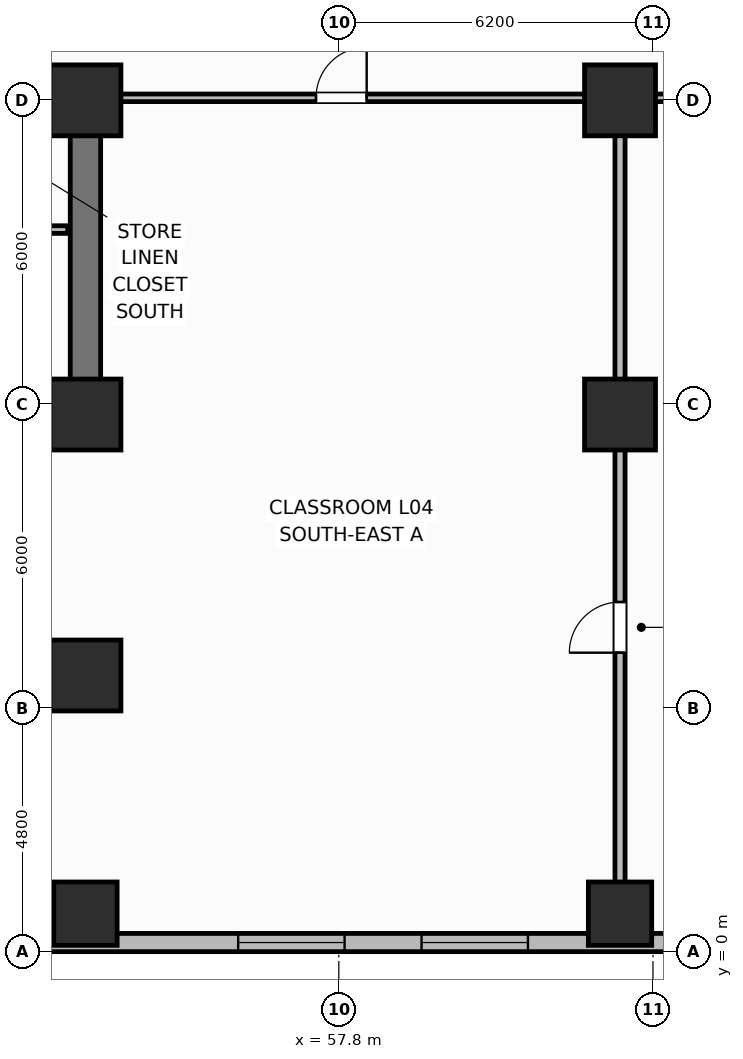
"""IFC4 building model, lengths in metres.
Left out: names, types, materials, properties, quantities, classifications, styles, units other than length and angle.
Written with IfcOpenShell. Run it as: python <this file> out.ifc"""

import sys

from ifc_helpers import new_model, si_unit, direction, frame, frame_2d, origin, origin_2d, place, context, subcontext, project, spatial, rectangle, extrude, element, fill, save


model = new_model("IFC4")
c1 = context("Model", 3, precision=1e-05, world=origin(), true_north=direction((0.0, 1.0)))
c2 = subcontext(c1, "Body", "Model", "MODEL_VIEW")
j1 = project(units=[si_unit("LENGTHUNIT", "METRE"), si_unit("PLANEANGLEUNIT", "RADIAN")], contexts=[c1])
p1 = place(None, origin())
s1 = spatial("IfcSite", under=j1, at=p1, CompositionType="ELEMENT")
p2 = place(p1, origin())
s2 = spatial("IfcBuilding", under=s1, at=p2, CompositionType="ELEMENT")
p3 = place(p2, frame((0.0, 0.0, 20.1)))
s3 = spatial("IfcBuildingStorey", under=s2, at=p3, CompositionType="ELEMENT", Elevation=20.1)
p4 = place(p3, frame((52.8, 10.6, 0.0), z_axis=(0.0, 0.0, 1.0), x_axis=(-1.0, 0.0, 0.0)))
e1 = element("IfcWall", 1, at=p4, inside=s3, PredefinedType="SHEAR", context=c2, shape_type="SweptSolid", body=[
    extrude(rectangle(XDim=27.2, YDim=0.6, at=frame_2d((13.6, 0.0))), origin(), (0.0, 0.0, 1.0), 4.5),
])
p5 = place(p3, frame((52.8, 10.9, 0.0), z_axis=(0.0, 0.0, 1.0), x_axis=(0.0, 1.0, 0.0)))
e2 = element("IfcWall", 2, at=p5, inside=s3, PredefinedType="SHEAR", context=c2, shape_type="SweptSolid", body=[
    extrude(rectangle(XDim=5.6, YDim=0.6, at=frame_2d((2.8, 0.0))), origin(), (0.0, 0.0, 1.0), 4.5),
])
p6 = place(p3, frame((25.6, 16.8, 0.0), z_axis=(0.0, 0.0, 1.0), x_axis=(1.0, 0.0, 0.0)))
e3 = element("IfcWall", 3, at=p6, inside=s3, PredefinedType="SHEAR", context=c2, shape_type="SweptSolid", body=[
    extrude(rectangle(XDim=27.2, YDim=0.6, at=frame_2d((13.6, 0.0))), origin(), (0.0, 0.0, 1.0), 4.5),
])
p7 = place(p6, frame((1.8, 0.0, 0.0)))
e4 = element("IfcOpeningElement", 4, at=p7, cuts=e3, PredefinedType="OPENING", context=c2, shape_type="SweptSolid", body=[
    extrude(rectangle(XDim=1.1, YDim=2.15, at=frame_2d((0.55, 1.075))), frame((0.0, 0.31, 0.0), z_axis=(0.0, -1.0, 0.0), x_axis=(1.0, 0.0, 0.0)), (0.0, 0.0, 1.0), 0.62),
])
p8 = place(p6, frame((5.6, 0.0, 0.0)))
e5 = element("IfcOpeningElement", 5, at=p8, cuts=e3, PredefinedType="OPENING", context=c2, shape_type="SweptSolid", body=[
    extrude(rectangle(XDim=0.85, YDim=2.1, at=frame_2d((0.425, 1.05))), frame((0.0, 0.31, 0.0), z_axis=(0.0, -1.0, 0.0), x_axis=(1.0, 0.0, 0.0)), (0.0, 0.0, 1.0), 0.62),
])
p9 = place(p6, frame((13.0, 0.0, 0.0)))
e6 = element("IfcOpeningElement", 6, at=p9, cuts=e3, PredefinedType="OPENING", context=c2, shape_type="SweptSolid", body=[
    extrude(rectangle(XDim=1.2, YDim=2.15, at=frame_2d((0.6, 1.075))), frame((0.0, 0.31, 0.0), z_axis=(0.0, -1.0, 0.0), x_axis=(1.0, 0.0, 0.0)), (0.0, 0.0, 1.0), 0.62),
])
p10 = place(p6, frame((20.4, 0.0, 0.0)))
e7 = element("IfcOpeningElement", 7, at=p10, cuts=e3, PredefinedType="OPENING", context=c2, shape_type="SweptSolid", body=[
    extrude(rectangle(XDim=1.3, YDim=2.2, at=frame_2d((0.65, 1.1))), frame((0.0, 0.31, 0.0), z_axis=(0.0, -1.0, 0.0), x_axis=(1.0, 0.0, 0.0)), (0.0, 0.0, 1.0), 0.62),
])
p11 = place(p6, frame((24.65, 0.0, 0.0)))
e8 = element("IfcOpeningElement", 8, at=p11, cuts=e3, PredefinedType="OPENING", context=c2, shape_type="SweptSolid", body=[
    extrude(rectangle(XDim=0.85, YDim=2.1, at=frame_2d((0.425, 1.05))), frame((0.0, 0.31, 0.0), z_axis=(0.0, -1.0, 0.0), x_axis=(1.0, 0.0, 0.0)), (0.0, 0.0, 1.0), 0.62),
])
for number, where, z_axis, x_axis in (
    (9, (52.8, 10.6, 0.0), (0.0, 0.0, 1.0), (1.0, 0.0, 0.0)),
    (10, (52.8, 16.8, 0.0), (0.0, 0.0, 1.0), (1.0, 0.0, 0.0)),
):
    element("IfcColumn", number, at=place(p3, frame(where, z_axis=z_axis, x_axis=x_axis)), inside=s3, PredefinedType="COLUMN", context=c2, shape_type="SweptSolid", body=[
        extrude(rectangle(XDim=1.4, YDim=1.4, at=origin_2d()), origin(), (0.0, 0.0, 1.0), 4.5),
    ])
for number, where, z_axis, x_axis in (
    (11, (52.8, 0.75, 0.0), (0.0, 0.0, 1.0), (1.0, 0.0, 0.0)),
    (12, (63.35, 0.75, 0.0), (0.0, 0.0, 1.0), (1.0, 0.0, 0.0)),
):
    element("IfcColumn", number, at=place(p3, frame(where, z_axis=z_axis, x_axis=x_axis)), inside=s3, PredefinedType="COLUMN", context=c2, shape_type="SweptSolid", body=[
        extrude(rectangle(XDim=1.25, YDim=1.25, at=origin_2d()), origin(), (0.0, 0.0, 1.0), 4.5),
    ])
for number, where, z_axis, x_axis in (
    (13, (52.8, 5.45, 0.0), (0.0, 0.0, 1.0), (1.0, 0.0, 0.0)),
    (14, (63.35, 10.6, 0.0), (0.0, 0.0, 1.0), (1.0, 0.0, 0.0)),
    (15, (63.35, 16.8, 0.0), (0.0, 0.0, 1.0), (1.0, 0.0, 0.0)),
):
    element("IfcColumn", number, at=place(p3, frame(where, z_axis=z_axis, x_axis=x_axis)), inside=s3, PredefinedType="COLUMN", context=c2, shape_type="SweptSolid", body=[
        extrude(rectangle(XDim=1.4, YDim=1.4, at=origin_2d()), origin(), (0.0, 0.0, 1.0), 4.5),
    ])
p12 = place(p3, frame((21.83, 0.18, 0.0), z_axis=(0.0, 0.0, 1.0), x_axis=(1.0, 0.0, 0.0)))
e16 = element("IfcWall", 16, at=p12, inside=s3, PredefinedType="SOLIDWALL", context=c2, shape_type="SweptSolid", body=[
    extrude(rectangle(XDim=55.59, YDim=0.36, at=frame_2d((27.795, 0.0))), origin(), (0.0, 0.0, 1.0), 2.3),
])
p13 = place(p12, frame((5.029, 0.0, 0.3)))
e17 = element("IfcOpeningElement", 17, at=p13, cuts=e16, PredefinedType="OPENING", context=c2, shape_type="SweptSolid", body=[
    extrude(rectangle(XDim=2.1, YDim=2.2, at=frame_2d((1.05, 1.1))), frame((0.0, 0.19, 0.0), z_axis=(0.0, -1.0, 0.0), x_axis=(1.0, 0.0, 0.0)), (0.0, 0.0, 1.0), 0.38),
])
p14 = place(p12, frame((8.648, 0.0, 0.3)))
e18 = element("IfcOpeningElement", 18, at=p14, cuts=e16, PredefinedType="OPENING", context=c2, shape_type="SweptSolid", body=[
    extrude(rectangle(XDim=2.1, YDim=2.2, at=frame_2d((1.05, 1.1))), frame((0.0, 0.19, 0.0), z_axis=(0.0, -1.0, 0.0), x_axis=(1.0, 0.0, 0.0)), (0.0, 0.0, 1.0), 0.38),
])
p15 = place(p12, frame((12.268, 0.0, 0.3)))
e19 = element("IfcOpeningElement", 19, at=p15, cuts=e16, PredefinedType="OPENING", context=c2, shape_type="SweptSolid", body=[
    extrude(rectangle(XDim=2.1, YDim=2.2, at=frame_2d((1.05, 1.1))), frame((0.0, 0.19, 0.0), z_axis=(0.0, -1.0, 0.0), x_axis=(1.0, 0.0, 0.0)), (0.0, 0.0, 1.0), 0.38),
])
p16 = place(p12, frame((19.506, 0.0, 0.3)))
e20 = element("IfcOpeningElement", 20, at=p16, cuts=e16, PredefinedType="OPENING", context=c2, shape_type="SweptSolid", body=[
    extrude(rectangle(XDim=2.1, YDim=2.2, at=frame_2d((1.05, 1.1))), frame((0.0, 0.19, 0.0), z_axis=(0.0, -1.0, 0.0), x_axis=(1.0, 0.0, 0.0)), (0.0, 0.0, 1.0), 0.38),
])
p17 = place(p12, frame((23.126, 0.0, 0.3)))
e21 = element("IfcOpeningElement", 21, at=p17, cuts=e16, PredefinedType="OPENING", context=c2, shape_type="SweptSolid", body=[
    extrude(rectangle(XDim=2.1, YDim=2.2, at=frame_2d((1.05, 1.1))), frame((0.0, 0.19, 0.0), z_axis=(0.0, -1.0, 0.0), x_axis=(1.0, 0.0, 0.0)), (0.0, 0.0, 1.0), 0.38),
])
p18 = place(p12, frame((26.745, 0.0, 0.3)))
e22 = element("IfcOpeningElement", 22, at=p18, cuts=e16, PredefinedType="OPENING", context=c2, shape_type="SweptSolid", body=[
    extrude(rectangle(XDim=2.1, YDim=2.2, at=frame_2d((1.05, 1.1))), frame((0.0, 0.19, 0.0), z_axis=(0.0, -1.0, 0.0), x_axis=(1.0, 0.0, 0.0)), (0.0, 0.0, 1.0), 0.38),
])
p19 = place(p12, frame((33.984, 0.0, 0.3)))
e23 = element("IfcOpeningElement", 23, at=p19, cuts=e16, PredefinedType="OPENING", context=c2, shape_type="SweptSolid", body=[
    extrude(rectangle(XDim=2.1, YDim=2.2, at=frame_2d((1.05, 1.1))), frame((0.0, 0.19, 0.0), z_axis=(0.0, -1.0, 0.0), x_axis=(1.0, 0.0, 0.0)), (0.0, 0.0, 1.0), 0.38),
])
p20 = place(p12, frame((37.603, 0.0, 0.3)))
e24 = element("IfcOpeningElement", 24, at=p20, cuts=e16, PredefinedType="OPENING", context=c2, shape_type="SweptSolid", body=[
    extrude(rectangle(XDim=2.1, YDim=2.2, at=frame_2d((1.05, 1.1))), frame((0.0, 0.19, 0.0), z_axis=(0.0, -1.0, 0.0), x_axis=(1.0, 0.0, 0.0)), (0.0, 0.0, 1.0), 0.38),
])
p21 = place(p12, frame((44.842, 0.0, 0.3)))
e25 = element("IfcOpeningElement", 25, at=p21, cuts=e16, PredefinedType="OPENING", context=c2, shape_type="SweptSolid", body=[
    extrude(rectangle(XDim=2.1, YDim=2.2, at=frame_2d((1.05, 1.1))), frame((0.0, 0.19, 0.0), z_axis=(0.0, -1.0, 0.0), x_axis=(1.0, 0.0, 0.0)), (0.0, 0.0, 1.0), 0.38),
])
p22 = place(p12, frame((52.08, 0.0, 0.3)))
e26 = element("IfcOpeningElement", 26, at=p22, cuts=e16, PredefinedType="OPENING", context=c2, shape_type="SweptSolid", body=[
    extrude(rectangle(XDim=2.1, YDim=2.2, at=frame_2d((1.05, 1.1))), frame((0.0, 0.19, 0.0), z_axis=(0.0, -1.0, 0.0), x_axis=(1.0, 0.0, 0.0)), (0.0, 0.0, 1.0), 0.38),
])
p23 = place(p3, frame((49.6, 14.25, 0.0), z_axis=(0.0, 0.0, 1.0), x_axis=(1.0, 0.0, 0.0)))
e27 = element("IfcWall", 27, at=p23, inside=s3, PredefinedType="PARTITIONING", context=c2, shape_type="SweptSolid", body=[
    extrude(rectangle(XDim=2.85, YDim=0.15, at=frame_2d((1.425, 0.0))), origin(), (0.0, 0.0, 1.0), 2.26),
])
p24 = place(p23, frame((0.9, 0.0, 0.0)))
e28 = element("IfcOpeningElement", 28, at=p24, cuts=e27, PredefinedType="OPENING", context=c2, shape_type="SweptSolid", body=[
    extrude(rectangle(XDim=0.85, YDim=2.1, at=frame_2d((0.425, 1.05))), frame((0.0, 0.085, 0.0), z_axis=(0.0, -1.0, 0.0), x_axis=(1.0, 0.0, 0.0)), (0.0, 0.0, 1.0), 0.17),
])
p25 = place(p3, frame((63.35, 0.4, 0.0), z_axis=(0.0, 0.0, 1.0), x_axis=(0.0, 1.0, 0.0)))
e29 = element("IfcWall", 29, at=p25, inside=s3, PredefinedType="PARTITIONING", context=c2, shape_type="SweptSolid", body=[
    extrude(rectangle(XDim=16.4, YDim=0.2, at=frame_2d((8.2, 0.0))), origin(), (0.0, 0.0, 1.0), 2.26),
])
p26 = place(p25, frame((5.5, 0.0, 0.0)))
e30 = element("IfcOpeningElement", 30, at=p26, cuts=e29, PredefinedType="OPENING", context=c2, shape_type="SweptSolid", body=[
    extrude(rectangle(XDim=1.0, YDim=2.15, at=frame_2d((0.5, 1.075))), frame((0.0, 0.11, 0.0), z_axis=(0.0, -1.0, 0.0), x_axis=(1.0, 0.0, 0.0)), (0.0, 0.0, 1.0), 0.22),
])
p27 = place(p3, frame((53.15, 16.85, 0.0), z_axis=(0.0, 0.0, 1.0), x_axis=(1.0, 0.0, 0.0)))
e31 = element("IfcWall", 31, at=p27, inside=s3, PredefinedType="PARTITIONING", context=c2, shape_type="SweptSolid", body=[
    extrude(rectangle(XDim=13.25, YDim=0.15, at=frame_2d((6.625, 0.0))), origin(), (0.0, 0.0, 1.0), 2.26),
])
p28 = place(p27, frame((4.2, 0.0, 0.0)))
e32 = element("IfcOpeningElement", 32, at=p28, cuts=e31, PredefinedType="OPENING", context=c2, shape_type="SweptSolid", body=[
    extrude(rectangle(XDim=1.0, YDim=2.15, at=frame_2d((0.5, 1.075))), frame((0.0, 0.085, 0.0), z_axis=(0.0, -1.0, 0.0), x_axis=(1.0, 0.0, 0.0)), (0.0, 0.0, 1.0), 0.17),
])
p29 = place(p19, origin())
e33 = element("IfcWindow", 33, at=p29, inside=s3, PartitioningType="SINGLE_PANEL", PredefinedType="WINDOW", context=c2, shape_type="SweptSolid", body=[
    extrude(rectangle(XDim=2.1, YDim=2.2, at=frame_2d((1.05, 1.1))), frame((0.0, 0.03, 0.0), z_axis=(0.0, -1.0, 0.0), x_axis=(1.0, 0.0, 0.0)), (0.0, 0.0, 1.0), 0.06),
])
fill(e23, e33)
p30 = place(p20, origin())
e34 = element("IfcWindow", 34, at=p30, inside=s3, PartitioningType="SINGLE_PANEL", PredefinedType="WINDOW", context=c2, shape_type="SweptSolid", body=[
    extrude(rectangle(XDim=2.1, YDim=2.2, at=frame_2d((1.05, 1.1))), frame((0.0, 0.03, 0.0), z_axis=(0.0, -1.0, 0.0), x_axis=(1.0, 0.0, 0.0)), (0.0, 0.0, 1.0), 0.06),
])
fill(e24, e34)
p31 = place(p26, origin())
e35 = element("IfcDoor", 35, at=p31, inside=s3, OperationType="SINGLE_SWING_LEFT", PredefinedType="DOOR", context=c2, shape_type="SweptSolid", body=[
    extrude(rectangle(XDim=1.0, YDim=2.15, at=frame_2d((0.5, 1.075))), frame((0.0, 0.025, 0.0), z_axis=(0.0, -1.0, 0.0), x_axis=(1.0, 0.0, 0.0)), (0.0, 0.0, 1.0), 0.05),
])
fill(e30, e35)
p32 = place(p28, origin())
e36 = element("IfcDoor", 36, at=p32, inside=s3, OperationType="SINGLE_SWING_RIGHT", PredefinedType="DOOR", context=c2, shape_type="SweptSolid", body=[
    extrude(rectangle(XDim=1.0, YDim=2.15, at=frame_2d((0.5, 1.075))), frame((0.0, 0.025, 0.0), z_axis=(0.0, -1.0, 0.0), x_axis=(1.0, 0.0, 0.0)), (0.0, 0.0, 1.0), 0.05),
])
fill(e32, e36)
save(model, sys.argv[1])
